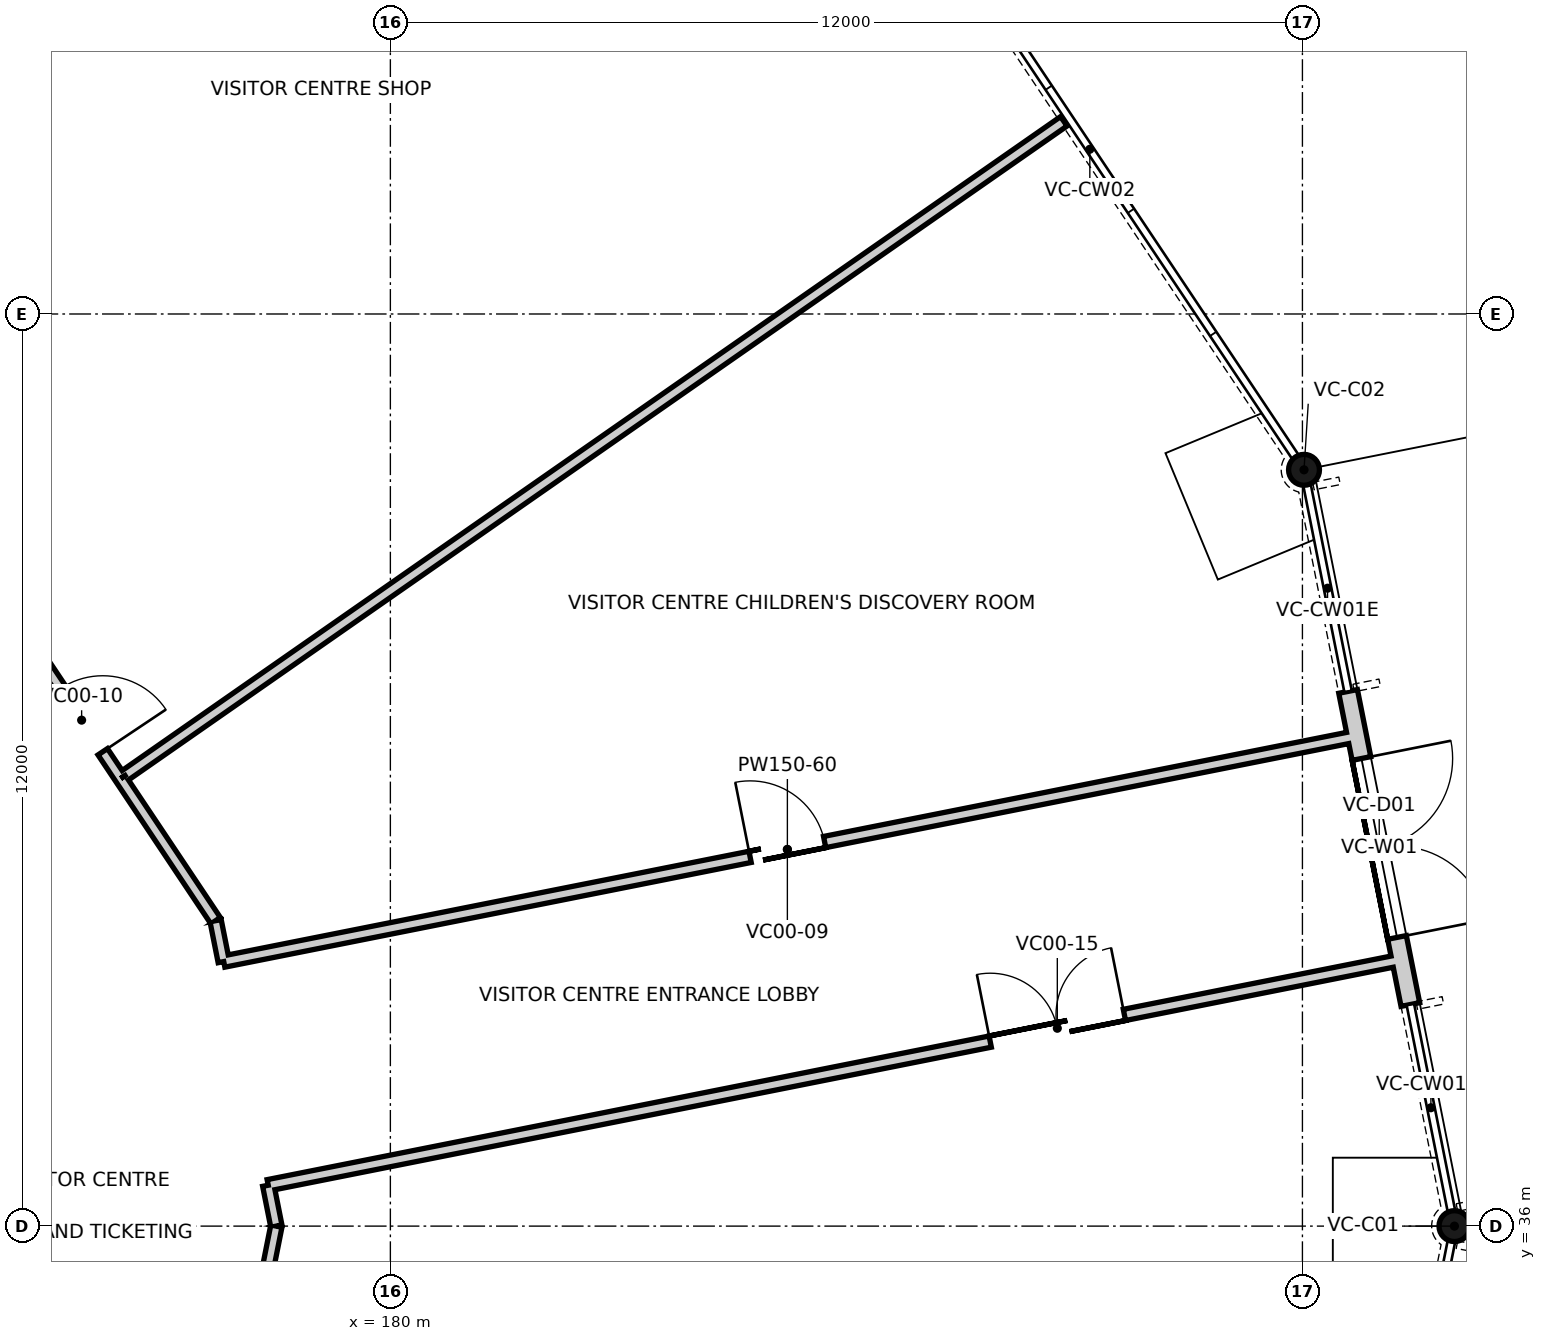
"""IFC4 building model, lengths in metres.
Left out: names, types, materials, properties, quantities, classifications, styles, units other than length and angle.
Written with IfcOpenShell. Run it as: python <this file> out.ifc"""

import sys

from ifc_helpers import new_model, si_unit, direction, frame, frame_2d, origin, origin_2d, place, context, subcontext, project, spatial, rectangle, hollow_circle, extrude, element, fill, save


model = new_model("IFC4")
c1 = context("Model", 3, precision=1e-05, world=origin(), true_north=direction((0.0, 1.0)))
c2 = subcontext(c1, "Body", "Model", "MODEL_VIEW")
j1 = project(units=[si_unit("LENGTHUNIT", "METRE"), si_unit("PLANEANGLEUNIT", "RADIAN")], contexts=[c1])
p1 = place(None, origin())
s1 = spatial("IfcSite", under=j1, at=p1, CompositionType="ELEMENT")
p2 = place(p1, origin())
s2 = spatial("IfcBuilding", under=s1, at=p2, CompositionType="ELEMENT")
p3 = place(p2, origin())
s3 = spatial("IfcBuildingStorey", under=s2, at=p3, CompositionType="ELEMENT", Elevation=0.0)
for number, where, z_axis, x_axis in (
    (1, (194.0, 36.0, 0.0), (0.0, 0.0, 1.0), (1.0, 0.0, 0.0)),
    (2, (192.021, 45.95, 0.0), (0.0, 0.0, 1.0), (1.0, 0.0, 0.0)),
):
    element("IfcColumn", number, at=place(p3, frame(where, z_axis=z_axis, x_axis=x_axis)), inside=s3, PredefinedType="COLUMN", context=c2, shape_type="SweptSolid", body=[
        extrude(hollow_circle(Radius=0.203, WallThickness=0.013, at=origin_2d()), origin(), (0.0, 0.0, 1.0), 4.649),
    ])
p4 = place(p3, frame((193.42, 38.915, 0.0), z_axis=(0.0, 0.0, 1.0), x_axis=(-0.195087556151, 0.980785830564, 0.0)))
e3 = element("IfcWall", 3, at=p4, inside=s3, PredefinedType="SOLIDWALL", context=c2, shape_type="SweptSolid", body=[
    extrude(rectangle(XDim=4.2, YDim=0.25, at=frame_2d((2.1, 0.0))), origin(), (0.0, 0.0, 1.0), 4.649),
])
p5 = place(p4, frame((0.9, 0.0, 0.0)))
e4 = element("IfcOpeningElement", 4, at=p5, cuts=e3, PredefinedType="OPENING", context=c2, shape_type="SweptSolid", body=[
    extrude(rectangle(XDim=2.4, YDim=2.4, at=frame_2d((1.2, 1.2))), frame((0.0, 0.135, 0.0), z_axis=(0.0, -1.0, 0.0), x_axis=(1.0, 0.0, 0.0)), (0.0, 0.0, 1.0), 0.27),
])
p6 = place(p3, frame((176.451, 41.888, 0.0), z_axis=(0.0, 0.0, 1.0), x_axis=(0.555551594428, -0.831482065909, 0.0)))
e5 = element("IfcWall", 5, at=p6, inside=s3, PredefinedType="PARTITIONING", context=c2, shape_type="SweptSolid", body=[
    extrude(rectangle(XDim=2.249, YDim=0.15, at=frame_2d((1.125, 0.0))), origin(), (0.0, 0.0, 1.0), 4.2),
])
p7 = place(p3, frame((177.701, 40.018, 0.0), z_axis=(0.0, 0.0, 1.0), x_axis=(0.194917863486, -0.980819568776, 0.0)))
e6 = element("IfcWall", 6, at=p7, inside=s3, PredefinedType="PARTITIONING", context=c2, shape_type="SweptSolid", body=[
    extrude(rectangle(XDim=0.549, YDim=0.15, at=frame_2d((0.274, 0.0))), origin(), (0.0, 0.0, 1.0), 4.2),
])
p8 = place(p3, frame((175.425, 43.425, 0.0), z_axis=(0.0, 0.0, 1.0), x_axis=(0.555645141411, -0.831419555234, 0.0)))
e7 = element("IfcWall", 7, at=p8, inside=s3, PredefinedType="PARTITIONING", context=c2, shape_type="SweptSolid", body=[
    extrude(rectangle(XDim=1.848, YDim=0.15, at=frame_2d((0.924, 0.0))), origin(), (0.0, 0.0, 1.0), 4.2),
])
p9 = place(p8, frame((0.424, 0.0, 0.0)))
e8 = element("IfcOpeningElement", 8, at=p9, cuts=e7, PredefinedType="OPENING", context=c2, shape_type="SweptSolid", body=[
    extrude(rectangle(XDim=1.0, YDim=2.1, at=frame_2d((0.5, 1.05))), frame((0.0, 0.085, 0.0), z_axis=(0.0, -1.0, 0.0), x_axis=(1.0, 0.0, 0.0)), (0.0, 0.0, 1.0), 0.17),
])
p10 = place(p3, frame((178.393, 36.538, 0.0), z_axis=(0.0, 0.0, 1.0), x_axis=(0.195002978104, -0.980802650145, 0.0)))
e9 = element("IfcWall", 9, at=p10, inside=s3, PredefinedType="PARTITIONING", context=c2, shape_type="SweptSolid", body=[
    extrude(rectangle(XDim=0.548, YDim=0.15, at=frame_2d((0.274, 0.0))), origin(), (0.0, 0.0, 1.0), 4.2),
])
p11 = place(p3, frame((178.5, 36.0, 0.0), z_axis=(0.0, 0.0, 1.0), x_axis=(-0.195096131281, -0.980784124851, 0.0)))
e10 = element("IfcWall", 10, at=p11, inside=s3, PredefinedType="PARTITIONING", context=c2, shape_type="SweptSolid", body=[
    extrude(rectangle(XDim=4.097, YDim=0.15, at=frame_2d((2.048, 0.0))), origin(), (0.0, 0.0, 1.0), 4.2),
])
p12 = place(p11, frame((1.968, 0.0, 0.0)))
e11 = element("IfcOpeningElement", 11, at=p12, cuts=e10, PredefinedType="OPENING", context=c2, shape_type="SweptSolid", body=[
    extrude(rectangle(XDim=1.8, YDim=2.1, at=frame_2d((0.9, 1.05))), frame((0.0, 0.085, 0.0), z_axis=(0.0, -1.0, 0.0), x_axis=(1.0, 0.0, 0.0)), (0.0, 0.0, 1.0), 0.17),
])
p13 = place(p3, frame((177.808, 39.48, 0.0), z_axis=(0.0, 0.0, 1.0), x_axis=(0.98078566725, 0.195088377196, 0.0)))
e12 = element("IfcWall", 12, at=p13, inside=s3, PredefinedType="PARTITIONING", context=c2, shape_type="SweptSolid", body=[
    extrude(rectangle(XDim=15.122, YDim=0.15, at=frame_2d((7.561, 0.0))), origin(), (0.0, 0.0, 1.0), 4.2),
])
p14 = place(p13, frame((7.061, 0.0, 0.0)))
e13 = element("IfcOpeningElement", 13, at=p14, cuts=e12, PredefinedType="OPENING", context=c2, shape_type="SweptSolid", body=[
    extrude(rectangle(XDim=1.0, YDim=2.1, at=frame_2d((0.5, 1.05))), frame((0.0, 0.085, 0.0), z_axis=(0.0, -1.0, 0.0), x_axis=(1.0, 0.0, 0.0)), (0.0, 0.0, 1.0), 0.17),
])
p15 = place(p3, frame((193.225, 39.488, 0.0), z_axis=(0.0, 0.0, 1.0), x_axis=(-0.98078505279, -0.195091466303, 0.0)))
e14 = element("IfcWall", 14, at=p15, inside=s3, PredefinedType="PARTITIONING", context=c2, shape_type="SweptSolid", body=[
    extrude(rectangle(XDim=15.122, YDim=0.15, at=frame_2d((7.561, 0.0))), origin(), (0.0, 0.0, 1.0), 4.2),
])
p16 = place(p15, frame((3.637, 0.0, 0.0)))
e15 = element("IfcOpeningElement", 15, at=p16, cuts=e14, PredefinedType="OPENING", context=c2, shape_type="SweptSolid", body=[
    extrude(rectangle(XDim=1.8, YDim=2.1, at=frame_2d((0.9, 1.05))), frame((0.0, 0.085, 0.0), z_axis=(0.0, -1.0, 0.0), x_axis=(1.0, 0.0, 0.0)), (0.0, 0.0, 1.0), 0.17),
])
p17 = place(p3, frame((176.509, 41.928, 0.0), z_axis=(0.0, 0.0, 1.0), x_axis=(0.820475613746, 0.571681526068, 0.0)))
e16 = element("IfcWall", 16, at=p17, inside=s3, PredefinedType="PARTITIONING", context=c2, shape_type="SweptSolid", body=[
    extrude(rectangle(XDim=15.055, YDim=0.15, at=frame_2d((7.527, 0.0))), origin(), (0.0, 0.0, 1.0), 4.2),
])
p18 = place(p5, frame((2.4, 0.0, 0.0), z_axis=(0.0, 0.0, 1.0), x_axis=(-1.0, 0.0, 0.0)))
e17 = element("IfcDoor", 17, at=p18, inside=s3, OperationType="DOUBLE_DOOR_SINGLE_SWING", PredefinedType="DOOR", context=c2, shape_type="SweptSolid", body=[
    extrude(rectangle(XDim=2.4, YDim=2.4, at=frame_2d((1.2, 1.2))), frame((0.0, 0.025, 0.0), z_axis=(0.0, -1.0, 0.0), x_axis=(1.0, 0.0, 0.0)), (0.0, 0.0, 1.0), 0.05),
])
fill(e4, e17)
p19 = place(p14, origin())
e18 = element("IfcDoor", 18, at=p19, inside=s3, OperationType="SINGLE_SWING_LEFT", PredefinedType="DOOR", context=c2, shape_type="SweptSolid", body=[
    extrude(rectangle(XDim=1.0, YDim=2.1, at=frame_2d((0.5, 1.05))), frame((0.0, 0.025, 0.0), z_axis=(0.0, -1.0, 0.0), x_axis=(1.0, 0.0, 0.0)), (0.0, 0.0, 1.0), 0.05),
])
fill(e13, e18)
p20 = place(p9, origin())
e19 = element("IfcDoor", 19, at=p20, inside=s3, OperationType="SINGLE_SWING_RIGHT", PredefinedType="DOOR", context=c2, shape_type="SweptSolid", body=[
    extrude(rectangle(XDim=1.0, YDim=2.1, at=frame_2d((0.5, 1.05))), frame((0.0, 0.025, 0.0), z_axis=(0.0, -1.0, 0.0), x_axis=(1.0, 0.0, 0.0)), (0.0, 0.0, 1.0), 0.05),
])
fill(e8, e19)
p21 = place(p16, frame((1.8, 0.0, 0.0), z_axis=(0.0, 0.0, 1.0), x_axis=(-1.0, 0.0, 0.0)))
e20 = element("IfcDoor", 20, at=p21, inside=s3, OperationType="DOUBLE_DOOR_SINGLE_SWING", PredefinedType="DOOR", context=c2, shape_type="SweptSolid", body=[
    extrude(rectangle(XDim=1.8, YDim=2.1, at=frame_2d((0.9, 1.05))), frame((0.0, 0.025, 0.0), z_axis=(0.0, -1.0, 0.0), x_axis=(1.0, 0.0, 0.0)), (0.0, 0.0, 1.0), 0.05),
])
fill(e15, e20)
save(model, sys.argv[1])
